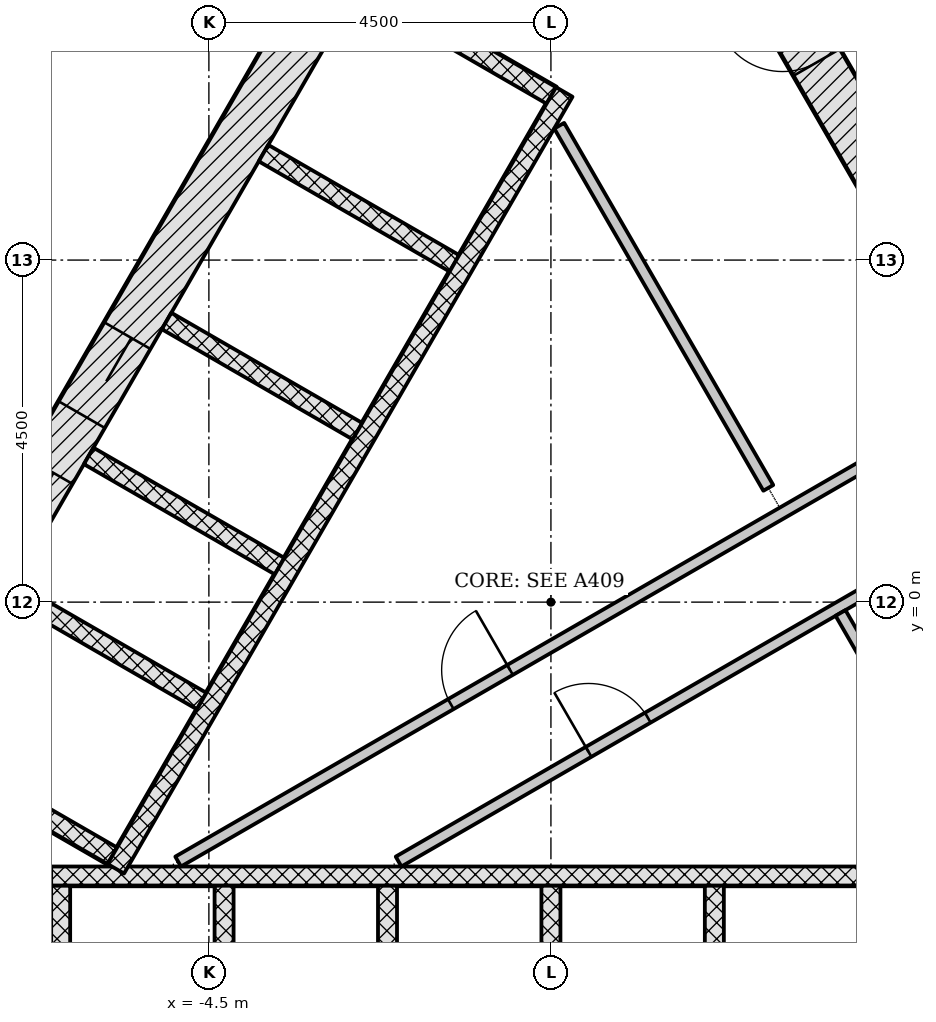
"""IFC4 building model, lengths in metres.
Left out: names, types, materials, properties, quantities, classifications, styles, units other than length and angle.
Written with IfcOpenShell. Run it as: python <this file> out.ifc"""

import sys

from ifc_helpers import new_model, si_unit, direction, frame, frame_2d, origin, place, context, subcontext, project, spatial, rectangle, extrude, element, fill, save


model = new_model("IFC4")
c1 = context("Model", 3, precision=1e-05, world=origin(), true_north=direction((0.0, 1.0)))
c2 = subcontext(c1, "Body", "Model", "MODEL_VIEW")
j1 = project(units=[si_unit("LENGTHUNIT", "METRE"), si_unit("PLANEANGLEUNIT", "RADIAN")], contexts=[c1])
p1 = place(None, origin())
s1 = spatial("IfcSite", under=j1, at=p1, CompositionType="ELEMENT")
p2 = place(p1, origin())
s2 = spatial("IfcBuilding", under=s1, at=p2, CompositionType="ELEMENT")
p3 = place(p2, frame((0.0, 0.0, 116.7)))
s3 = spatial("IfcBuildingStorey", under=s2, at=p3, CompositionType="ELEMENT", Elevation=116.7)
p4 = place(p3, frame((10.311, -4.703, -0.2), z_axis=(0.0, 0.0, 1.0), x_axis=(-0.500001446645, 0.866024568562, 0.0)))
e1 = element("IfcWall", 1, at=p4, inside=s3, PredefinedType="SHEAR", context=c2, shape_type="SweptSolid", body=[
    extrude(rectangle(XDim=18.458, YDim=0.7, at=frame_2d((9.229, 0.0))), origin(), (0.0, 0.0, 1.0), 3.6),
])
p5 = place(p4, frame((7.5, 0.0, 0.2)))
e2 = element("IfcOpeningElement", 2, at=p5, cuts=e1, PredefinedType="OPENING", context=c2, shape_type="SweptSolid", body=[
    extrude(rectangle(XDim=1.0, YDim=2.1, at=frame_2d((0.5, 1.05))), frame((0.0, 0.36, 0.0), z_axis=(0.0, -1.0, 0.0), x_axis=(1.0, 0.0, 0.0)), (0.0, 0.0, 1.0), 0.72),
])
p6 = place(p4, frame((1.852, 0.0, 0.2)))
e3 = element("IfcOpeningElement", 3, at=p6, cuts=e1, PredefinedType="OPENING", context=c2, shape_type="SweptSolid", body=[
    extrude(rectangle(XDim=0.9, YDim=2.1, at=frame_2d((0.45, 1.05))), frame((0.0, 0.36, 0.0), z_axis=(0.0, -1.0, 0.0), x_axis=(1.0, 0.0, 0.0)), (0.0, 0.0, 1.0), 0.72),
])
p7 = place(p4, frame((5.238, 0.0, 0.2)))
e4 = element("IfcOpeningElement", 4, at=p7, cuts=e1, PredefinedType="OPENING", context=c2, shape_type="SweptSolid", body=[
    extrude(rectangle(XDim=1.0, YDim=2.1, at=frame_2d((0.5, 1.05))), frame((0.0, 0.36, 0.0), z_axis=(0.0, -1.0, 0.0), x_axis=(1.0, 0.0, 0.0)), (0.0, 0.0, 1.0), 0.72),
])
p8 = place(p4, frame((13.63, 0.0, 0.2)))
e5 = element("IfcOpeningElement", 5, at=p8, cuts=e1, PredefinedType="OPENING", context=c2, shape_type="SweptSolid", body=[
    extrude(rectangle(XDim=0.9, YDim=2.1, at=frame_2d((0.45, 1.05))), frame((0.0, 0.36, 0.0), z_axis=(0.0, -1.0, 0.0), x_axis=(1.0, 0.0, 0.0)), (0.0, 0.0, 1.0), 0.72),
])
p9 = place(p3, frame((-1.083, 11.281, -0.2), z_axis=(0.0, 0.0, 1.0), x_axis=(-0.500001446645, -0.866024568562, 0.0)))
e6 = element("IfcWall", 6, at=p9, inside=s3, PredefinedType="SHEAR", context=c2, shape_type="SweptSolid", body=[
    extrude(rectangle(XDim=18.458, YDim=0.7, at=frame_2d((9.229, 0.0))), origin(), (0.0, 0.0, 1.0), 3.6),
])
p10 = place(p9, frame((8.979, 0.0, 0.2)))
e7 = element("IfcOpeningElement", 7, at=p10, cuts=e6, PredefinedType="OPENING", context=c2, shape_type="SweptSolid", body=[
    extrude(rectangle(XDim=1.2, YDim=2.1, at=frame_2d((0.6, 1.05))), frame((0.0, 0.36, 0.0), z_axis=(0.0, -1.0, 0.0), x_axis=(1.0, 0.0, 0.0)), (0.0, 0.0, 1.0), 0.72),
])
p11 = place(p9, frame((11.029, 0.0, 0.2)))
e8 = element("IfcOpeningElement", 8, at=p11, cuts=e6, PredefinedType="OPENING", context=c2, shape_type="SweptSolid", body=[
    extrude(rectangle(XDim=1.2, YDim=2.1, at=frame_2d((0.6, 1.05))), frame((0.0, 0.36, 0.0), z_axis=(0.0, -1.0, 0.0), x_axis=(1.0, 0.0, 0.0)), (0.0, 0.0, 1.0), 0.72),
])
for number, where, z_axis, x_axis in (
    (9, (-6.45, -6.228, -0.2), (0.0, 0.0, 1.0), (0.0, 1.0, 0.0)),
    (10, (-4.3, -6.228, -0.2), (0.0, 0.0, 1.0), (0.0, 1.0, 0.0)),
    (11, (-2.15, -6.228, -0.2), (0.0, 0.0, 1.0), (0.0, 1.0, 0.0)),
    (12, (0.0, -6.228, -0.2), (0.0, 0.0, 1.0), (0.0, 1.0, 0.0)),
    (13, (2.15, -6.228, -0.2), (0.0, 0.0, 1.0), (0.0, 1.0, 0.0)),
):
    element("IfcWall", number, at=place(p3, frame(where, z_axis=z_axis, x_axis=x_axis)), inside=s3, PredefinedType="PARTITIONING", context=c2, shape_type="SweptSolid", body=[
        extrude(rectangle(XDim=2.5, YDim=0.25, at=frame_2d((1.25, 0.0))), origin(), (0.0, 0.0, 1.0), 3.6),
    ])
p12 = place(p3, frame((-6.575, -3.603, 0.0), z_axis=(0.0, 0.0, 1.0), x_axis=(1.0, 0.0, 0.0)))
e14 = element("IfcWall", 14, at=p12, inside=s3, PredefinedType="PARTITIONING", context=c2, shape_type="SweptSolid", body=[
    extrude(rectangle(XDim=13.15, YDim=0.25, at=frame_2d((6.575, 0.0))), origin(), (0.0, 0.0, 1.0), 3.4),
])
p13 = place(p3, frame((-2.506, 8.115, -0.2), z_axis=(0.0, 0.0, 1.0), x_axis=(0.865996321171, -0.50005036918, 0.0)))
e15 = element("IfcWall", 15, at=p13, inside=s3, PredefinedType="PARTITIONING", context=c2, shape_type="SweptSolid", body=[
    extrude(rectangle(XDim=2.9, YDim=0.25, at=frame_2d((1.45, 0.0))), origin(), (0.0, 0.0, 1.0), 3.6),
])
for number, where, z_axis, x_axis in (
    (16, (-3.781, 5.907, -0.2), (0.0, 0.0, 1.0), (0.866, -0.5, 0.0)),
    (17, (-5.056, 3.699, -0.2), (0.0, 0.0, 1.0), (0.866, -0.5, 0.0)),
    (18, (-6.081, 1.923, -0.2), (0.0, 0.0, 1.0), (0.866, -0.5, 0.0)),
    (19, (-7.106, 0.148, -0.2), (0.0, 0.0, 1.0), (0.866, -0.5, 0.0)),
    (20, (-8.281, -1.887, -0.2), (0.0, 0.0, 1.0), (0.866, -0.5, 0.0)),
):
    element("IfcWall", number, at=place(p3, frame(where, z_axis=z_axis, x_axis=x_axis)), inside=s3, PredefinedType="PARTITIONING", context=c2, shape_type="SweptSolid", body=[
        extrude(rectangle(XDim=2.9, YDim=0.25, at=frame_2d((1.45, 0.0))), origin(), (0.0, 0.0, 1.0), 3.6),
    ])
p14 = place(p3, frame((0.176, 6.711, 0.0), z_axis=(0.0, 0.0, 1.0), x_axis=(-0.500004227369, -0.866022963098, 0.0)))
e21 = element("IfcWall", 21, at=p14, inside=s3, PredefinedType="PARTITIONING", context=c2, shape_type="SweptSolid", body=[
    extrude(rectangle(XDim=11.8, YDim=0.25, at=frame_2d((5.9, 0.0))), origin(), (0.0, 0.0, 1.0), 3.4),
])
p15 = place(p3, frame((-4.904, -3.413, 0.0), z_axis=(0.0, 0.0, 1.0), x_axis=(0.866020716117, 0.500008119189, 0.0)))
e22 = element("IfcWall", 22, at=p15, inside=s3, PredefinedType="PARTITIONING", context=c2, shape_type="SweptSolid", body=[
    extrude(rectangle(XDim=12.182, YDim=0.15, at=frame_2d((6.091, 0.0))), origin(), (0.0, 0.0, 1.0), 3.4),
])
p16 = place(p15, frame((4.142, 0.0, 0.0)))
e23 = element("IfcOpeningElement", 23, at=p16, cuts=e22, PredefinedType="OPENING", context=c2, shape_type="SweptSolid", body=[
    extrude(rectangle(XDim=0.9, YDim=2.1, at=frame_2d((0.45, 1.05))), frame((0.0, 0.085, 0.0), z_axis=(0.0, -1.0, 0.0), x_axis=(1.0, 0.0, 0.0)), (0.0, 0.0, 1.0), 0.17),
])
p17 = place(p3, frame((-2.004, -3.413, 0.0), z_axis=(0.0, 0.0, 1.0), x_axis=(0.866030034802, 0.499991978756, 0.0)))
e24 = element("IfcWall", 24, at=p17, inside=s3, PredefinedType="PARTITIONING", context=c2, shape_type="SweptSolid", body=[
    extrude(rectangle(XDim=9.671, YDim=0.15, at=frame_2d((4.835, 0.0))), origin(), (0.0, 0.0, 1.0), 3.4),
])
p18 = place(p17, frame((2.886, 0.0, 0.0)))
e25 = element("IfcOpeningElement", 25, at=p18, cuts=e24, PredefinedType="OPENING", context=c2, shape_type="SweptSolid", body=[
    extrude(rectangle(XDim=0.9, YDim=2.1, at=frame_2d((0.45, 1.05))), frame((0.0, 0.085, 0.0), z_axis=(0.0, -1.0, 0.0), x_axis=(1.0, 0.0, 0.0)), (0.0, 0.0, 1.0), 0.17),
])
p19 = place(p3, frame((2.86, 1.503, 0.0), z_axis=(0.0, 0.0, 1.0), x_axis=(-0.500014382217, 0.866017100048, 0.0)))
e26 = element("IfcWall", 26, at=p19, inside=s3, PredefinedType="PARTITIONING", context=c2, shape_type="SweptSolid", body=[
    extrude(rectangle(XDim=5.502, YDim=0.15, at=frame_2d((2.751, 0.0))), origin(), (0.0, 0.0, 1.0), 3.4),
])
p20 = place(p3, frame((5.713, -3.439, 0.0), z_axis=(0.0, 0.0, 1.0), x_axis=(-0.499981559197, 0.866036050325, 0.0)))
e27 = element("IfcWall", 27, at=p20, inside=s3, PredefinedType="PARTITIONING", context=c2, shape_type="SweptSolid", body=[
    extrude(rectangle(XDim=3.806, YDim=0.15, at=frame_2d((1.903, 0.0))), origin(), (0.0, 0.0, 1.0), 3.4),
])
p21 = place(p3, frame((-16.169, -3.099, 0.0), z_axis=(0.0, 0.0, 1.0), x_axis=(0.499999805269, 0.866025516212, 0.0)))
e28 = element("IfcWall", 28, at=p21, inside=s3, PredefinedType="PARTITIONING", context=c2, shape_type="SweptSolid", body=[
    extrude(rectangle(XDim=22.097, YDim=0.15, at=frame_2d((11.049, 0.0))), origin(), (0.0, 0.0, 1.0), 2.847),
])
p22 = place(p21, frame((17.842, 0.0, 0.0)))
e29 = element("IfcOpeningElement", 29, at=p22, cuts=e28, PredefinedType="OPENING", context=c2, shape_type="SweptSolid", body=[
    extrude(rectangle(XDim=1.5, YDim=2.1, at=frame_2d((0.75, 1.05))), frame((0.0, 0.085, 0.0), z_axis=(0.0, -1.0, 0.0), x_axis=(1.0, 0.0, 0.0)), (0.0, 0.0, 1.0), 0.17),
])
p23 = place(p21, frame((12.474, 0.0, 0.0)))
e30 = element("IfcOpeningElement", 30, at=p23, cuts=e28, PredefinedType="OPENING", context=c2, shape_type="SweptSolid", body=[
    extrude(rectangle(XDim=1.0, YDim=2.1, at=frame_2d((0.5, 1.05))), frame((0.0, 0.085, 0.0), z_axis=(0.0, -1.0, 0.0), x_axis=(1.0, 0.0, 0.0)), (0.0, 0.0, 1.0), 0.17),
])
p24 = place(p21, frame((4.503, 0.0, 0.0)))
e31 = element("IfcOpeningElement", 31, at=p24, cuts=e28, PredefinedType="OPENING", context=c2, shape_type="SweptSolid", body=[
    extrude(rectangle(XDim=1.5, YDim=2.1, at=frame_2d((0.75, 1.05))), frame((0.0, 0.085, 0.0), z_axis=(0.0, -1.0, 0.0), x_axis=(1.0, 0.0, 0.0)), (0.0, 0.0, 1.0), 0.17),
])
p25 = place(p3, frame((-4.407, 13.374, 0.0), z_axis=(0.0, 0.0, 1.0), x_axis=(-0.499997181693, -0.866027030928, 0.0)))
e32 = element("IfcWall", 32, at=p25, inside=s3, PredefinedType="PARTITIONING", context=c2, shape_type="SweptSolid", body=[
    extrude(rectangle(XDim=16.77, YDim=0.15, at=frame_2d((8.385, 0.0))), origin(), (0.0, 0.0, 1.0), 2.847),
])
p26 = place(p25, frame((8.879, 0.0, 0.0)))
e33 = element("IfcOpeningElement", 33, at=p26, cuts=e32, PredefinedType="OPENING", context=c2, shape_type="SweptSolid", body=[
    extrude(rectangle(XDim=1.0, YDim=2.1, at=frame_2d((0.5, 1.05))), frame((0.0, 0.085, 0.0), z_axis=(0.0, -1.0, 0.0), x_axis=(1.0, 0.0, 0.0)), (0.0, 0.0, 1.0), 0.17),
])
p27 = place(p10, origin())
e34 = element("IfcDoor", 34, at=p27, inside=s3, OperationType="DOUBLE_DOOR_SLIDING", PredefinedType="DOOR", context=c2, shape_type="SweptSolid", body=[
    extrude(rectangle(XDim=1.2, YDim=2.1, at=frame_2d((0.6, 1.05))), frame((0.0, 0.025, 0.0), z_axis=(0.0, -1.0, 0.0), x_axis=(1.0, 0.0, 0.0)), (0.0, 0.0, 1.0), 0.05),
])
fill(e7, e34)
p28 = place(p8, origin())
e35 = element("IfcDoor", 35, at=p28, inside=s3, OperationType="SINGLE_SWING_RIGHT", PredefinedType="DOOR", context=c2, shape_type="SweptSolid", body=[
    extrude(rectangle(XDim=0.9, YDim=2.1, at=frame_2d((0.45, 1.05))), frame((0.0, 0.075, 0.0), z_axis=(0.0, -1.0, 0.0), x_axis=(1.0, 0.0, 0.0)), (0.0, 0.0, 1.0), 0.15),
])
fill(e5, e35)
p29 = place(p18, origin())
e36 = element("IfcDoor", 36, at=p29, inside=s3, OperationType="SINGLE_SWING_LEFT", PredefinedType="DOOR", context=c2, shape_type="SweptSolid", body=[
    extrude(rectangle(XDim=0.9, YDim=2.1, at=frame_2d((0.45, 1.05))), frame((0.0, 0.025, 0.0), z_axis=(0.0, -1.0, 0.0), x_axis=(1.0, 0.0, 0.0)), (0.0, 0.0, 1.0), 0.05),
])
fill(e25, e36)
p30 = place(p16, origin())
e37 = element("IfcDoor", 37, at=p30, inside=s3, OperationType="SINGLE_SWING_RIGHT", PredefinedType="DOOR", context=c2, shape_type="SweptSolid", body=[
    extrude(rectangle(XDim=0.9, YDim=2.1, at=frame_2d((0.45, 1.05))), frame((0.0, 0.025, 0.0), z_axis=(0.0, -1.0, 0.0), x_axis=(1.0, 0.0, 0.0)), (0.0, 0.0, 1.0), 0.05),
])
fill(e23, e37)
save(model, sys.argv[1])
